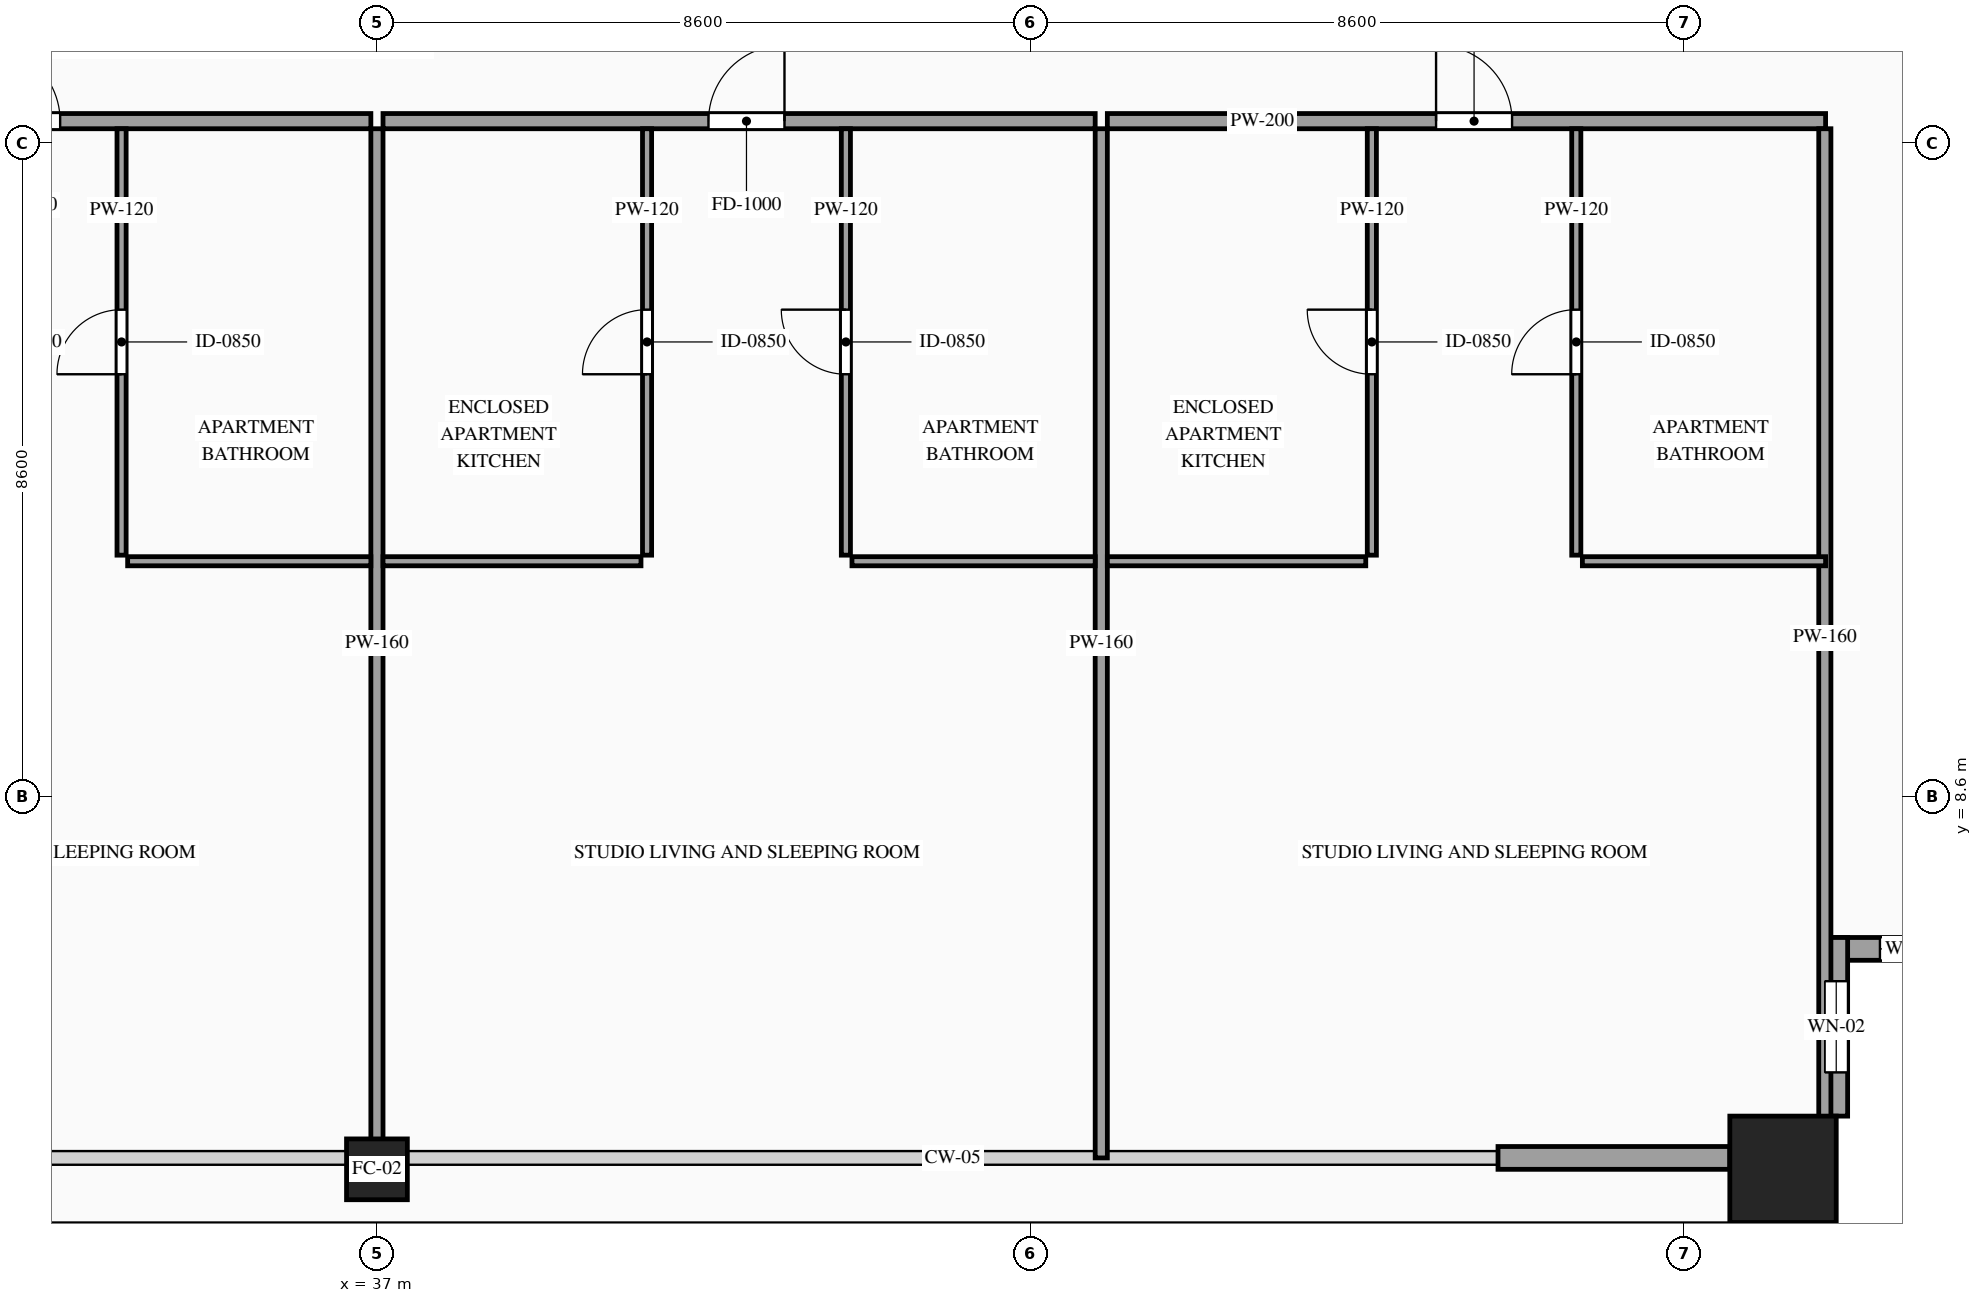
"""IFC4 building model, lengths in metres.
Left out: names, types, materials, properties, quantities, classifications, styles, units other than length and angle.
Written with IfcOpenShell. Run it as: python <this file> out.ifc"""

import sys

from ifc_helpers import new_model, si_unit, direction, frame, frame_2d, origin, origin_2d, place, context, subcontext, project, spatial, rectangle, hollow_rectangle, extrude, source, transform, mapped, element, fill, save


model = new_model("IFC4")
c1 = context("Model", 3, precision=1e-05, world=origin(), true_north=direction((0.0, 1.0)))
c2 = subcontext(c1, "Body", "Model", "MODEL_VIEW")
j1 = project(units=[si_unit("LENGTHUNIT", "METRE"), si_unit("PLANEANGLEUNIT", "RADIAN")], contexts=[c1])
p1 = place(None, origin())
s1 = spatial("IfcSite", under=j1, at=p1, CompositionType="ELEMENT")
p2 = place(p1, origin())
s2 = spatial("IfcBuilding", under=s1, at=p2, CompositionType="ELEMENT")
p3 = place(p2, frame((0.0, 0.0, 181.0)))
s3 = spatial("IfcBuildingStorey", under=s2, at=p3, CompositionType="ELEMENT", Elevation=181.0)
m1 = source(origin(), c2, "Body", "SweptSolid", [
    extrude(hollow_rectangle(XDim=0.8, YDim=0.8, WallThickness=0.036, at=origin_2d()), origin(), (0.0, 0.0, 1.0), 3.5),
])
p4 = place(p3, frame((37.0, 3.7, 0.0), z_axis=(0.0, 0.0, 1.0), x_axis=(1.0, 0.0, 0.0)))
e1 = element("IfcColumn", 1, at=p4, inside=s3, PredefinedType="COLUMN", context=c2, shape_type="MappedRepresentation", body=[
    mapped(m1, transform((0.0, 0.0, 0.0), scale=1.0)),
])
m2 = source(origin(), c2, "Body", "SweptSolid", [
    extrude(hollow_rectangle(XDim=1.4, YDim=1.4, WallThickness=0.06, at=origin_2d()), origin(), (0.0, 0.0, 1.0), 3.5),
])
p5 = place(p3, frame((55.5, 3.7, 0.0), z_axis=(0.0, 0.0, 1.0), x_axis=(1.0, 0.0, 0.0)))
e2 = element("IfcColumn", 2, at=p5, inside=s3, PredefinedType="COLUMN", context=c2, shape_type="MappedRepresentation", body=[
    mapped(m2, transform((0.0, 0.0, 0.0), scale=1.0)),
])
p6 = place(p3, frame((56.05, 6.6, 0.0), z_axis=(0.0, 0.0, 1.0), x_axis=(1.0, 0.0, 0.0)))
e3 = element("IfcWall", 3, at=p6, inside=s3, PredefinedType="SOLIDWALL", context=c2, shape_type="SweptSolid", body=[
    extrude(rectangle(XDim=2.35, YDim=0.3, at=frame_2d((1.175, 0.0))), origin(), (0.0, 0.0, 1.0), 3.28),
])
p7 = place(p6, frame((0.725, 0.0, 0.85)))
e4 = element("IfcOpeningElement", 4, at=p7, cuts=e3, PredefinedType="OPENING", context=c2, shape_type="SweptSolid", body=[
    extrude(rectangle(XDim=0.9, YDim=1.5, at=frame_2d((0.45, 0.75))), frame((0.0, 0.165, 0.0), z_axis=(0.0, -1.0, 0.0), x_axis=(1.0, 0.0, 0.0)), (0.0, 0.0, 1.0), 0.33),
])
p8 = place(p3, frame((56.2, 4.4, 0.0), z_axis=(0.0, 0.0, 1.0), x_axis=(0.0, 1.0, 0.0)))
e5 = element("IfcWall", 5, at=p8, inside=s3, PredefinedType="SOLIDWALL", context=c2, shape_type="SweptSolid", body=[
    extrude(rectangle(XDim=2.35, YDim=0.3, at=frame_2d((1.175, 0.0))), origin(), (0.0, 0.0, 1.0), 3.28),
])
p9 = place(p8, frame((0.575, 0.0, 0.85)))
e6 = element("IfcOpeningElement", 6, at=p9, cuts=e5, PredefinedType="OPENING", context=c2, shape_type="SweptSolid", body=[
    extrude(rectangle(XDim=1.2, YDim=2.1, at=frame_2d((0.6, 1.05))), frame((0.0, 0.165, 0.0), z_axis=(0.0, -1.0, 0.0), x_axis=(1.0, 0.0, 0.0)), (0.0, 0.0, 1.0), 0.33),
])
m3 = source(origin(), c2, "Body", "SweptSolid", [
    extrude(rectangle(XDim=3.05, YDim=0.3, at=frame_2d((1.525, 0.0))), origin(), (0.0, 0.0, 1.0), 2.835),
])
p10 = place(p3, frame((51.75, 3.85, 0.0), z_axis=(0.0, 0.0, 1.0), x_axis=(1.0, 0.0, 0.0)))
e7 = element("IfcWall", 7, at=p10, inside=s3, PredefinedType="SOLIDWALL", context=c2, shape_type="MappedRepresentation", body=[
    mapped(m3, transform((0.0, 0.0, 0.0), scale=1.0)),
])
p11 = place(p3, frame((27.55, 17.49, 0.0), z_axis=(0.0, 0.0, 1.0), x_axis=(1.0, 0.0, 0.0)))
e8 = element("IfcWall", 8, at=p11, inside=s3, PredefinedType="PARTITIONING", context=c2, shape_type="SweptSolid", body=[
    extrude(rectangle(XDim=9.37, YDim=0.2, at=frame_2d((4.685, 0.0))), origin(), (0.0, 0.0, 1.0), 3.28),
])
p12 = place(p11, frame((4.282, 0.0, 0.0)))
e9 = element("IfcOpeningElement", 9, at=p12, cuts=e8, PredefinedType="OPENING", context=c2, shape_type="SweptSolid", body=[
    extrude(rectangle(XDim=1.0, YDim=2.2, at=frame_2d((0.5, 1.1))), frame((0.0, 0.115, 0.0), z_axis=(0.0, -1.0, 0.0), x_axis=(1.0, 0.0, 0.0)), (0.0, 0.0, 1.0), 0.23),
])
m4 = source(origin(), c2, "Body", "SweptSolid", [
    extrude(rectangle(XDim=13.54, YDim=0.16, at=frame_2d((6.77, 0.0))), origin(), (0.0, 0.0, 1.0), 2.687),
])
p13 = place(p3, frame((37.0, 3.85, 0.0), z_axis=(0.0, 0.0, 1.0), x_axis=(0.0, 1.0, 0.0)))
e10 = element("IfcWall", 10, at=p13, inside=s3, PredefinedType="PARTITIONING", context=c2, shape_type="MappedRepresentation", body=[
    mapped(m4, transform((0.0, 0.0, 0.0), scale=1.0)),
])
m5 = source(origin(), c2, "Body", "SweptSolid", [
    extrude(rectangle(XDim=3.2, YDim=0.12, at=frame_2d((1.6, 0.0))), origin(), (0.0, 0.0, 1.0), 2.875),
])
p14 = place(p3, frame((33.72, 11.7, 0.0), z_axis=(0.0, 0.0, 1.0), x_axis=(1.0, 0.0, 0.0)))
e11 = element("IfcWall", 11, at=p14, inside=s3, PredefinedType="PARTITIONING", context=c2, shape_type="MappedRepresentation", body=[
    mapped(m5, transform((0.0, 0.0, 0.0), scale=1.0)),
])
p15 = place(p3, frame((33.64, 11.78, 0.0), z_axis=(0.0, 0.0, 1.0), x_axis=(0.0, 1.0, 0.0)))
e12 = element("IfcWall", 12, at=p15, inside=s3, PredefinedType="PARTITIONING", context=c2, shape_type="SweptSolid", body=[
    extrude(rectangle(XDim=5.61, YDim=0.12, at=frame_2d((2.805, 0.0))), origin(), (0.0, 0.0, 1.0), 3.28),
])
p16 = place(p15, frame((2.38, 0.0, 0.0)))
e13 = element("IfcOpeningElement", 13, at=p16, cuts=e12, PredefinedType="OPENING", context=c2, shape_type="SweptSolid", body=[
    extrude(rectangle(XDim=0.85, YDim=2.1, at=frame_2d((0.425, 1.05))), frame((0.0, 0.075, 0.0), z_axis=(0.0, -1.0, 0.0), x_axis=(1.0, 0.0, 0.0)), (0.0, 0.0, 1.0), 0.15),
])
p17 = place(p3, frame((37.08, 17.49, 0.0), z_axis=(0.0, 0.0, 1.0), x_axis=(1.0, 0.0, 0.0)))
e14 = element("IfcWall", 14, at=p17, inside=s3, PredefinedType="PARTITIONING", context=c2, shape_type="SweptSolid", body=[
    extrude(rectangle(XDim=9.37, YDim=0.2, at=frame_2d((4.685, 0.0))), origin(), (0.0, 0.0, 1.0), 3.28),
])
p18 = place(p17, frame((4.282, 0.0, 0.0)))
e15 = element("IfcOpeningElement", 15, at=p18, cuts=e14, PredefinedType="OPENING", context=c2, shape_type="SweptSolid", body=[
    extrude(rectangle(XDim=1.0, YDim=2.2, at=frame_2d((0.5, 1.1))), frame((0.0, 0.115, 0.0), z_axis=(0.0, -1.0, 0.0), x_axis=(1.0, 0.0, 0.0)), (0.0, 0.0, 1.0), 0.23),
])
m6 = source(origin(), c2, "Body", "SweptSolid", [
    extrude(rectangle(XDim=13.54, YDim=0.16, at=frame_2d((6.77, 0.0))), origin(), (0.0, 0.0, 1.0), 3.28),
])
p19 = place(p3, frame((46.53, 3.85, 0.0), z_axis=(0.0, 0.0, 1.0), x_axis=(0.0, 1.0, 0.0)))
e16 = element("IfcWall", 16, at=p19, inside=s3, PredefinedType="PARTITIONING", context=c2, shape_type="MappedRepresentation", body=[
    mapped(m6, transform((0.0, 0.0, 0.0), scale=1.0)),
])
m7 = source(origin(), c2, "Body", "SweptSolid", [
    extrude(rectangle(XDim=3.394, YDim=0.12, at=frame_2d((1.697, 0.0))), origin(), (0.0, 0.0, 1.0), 2.875),
])
p20 = place(p3, frame((37.08, 11.7, 0.0), z_axis=(0.0, 0.0, 1.0), x_axis=(1.0, 0.0, 0.0)))
e17 = element("IfcWall", 17, at=p20, inside=s3, PredefinedType="PARTITIONING", context=c2, shape_type="MappedRepresentation", body=[
    mapped(m7, transform((0.0, 0.0, 0.0), scale=1.0)),
])
p21 = place(p3, frame((40.554, 11.78, 0.0), z_axis=(0.0, 0.0, 1.0), x_axis=(0.0, 1.0, 0.0)))
e18 = element("IfcWall", 18, at=p21, inside=s3, PredefinedType="PARTITIONING", context=c2, shape_type="SweptSolid", body=[
    extrude(rectangle(XDim=5.61, YDim=0.12, at=frame_2d((2.805, 0.0))), origin(), (0.0, 0.0, 1.0), 3.28),
])
p22 = place(p21, frame((2.38, 0.0, 0.0)))
e19 = element("IfcOpeningElement", 19, at=p22, cuts=e18, PredefinedType="OPENING", context=c2, shape_type="SweptSolid", body=[
    extrude(rectangle(XDim=0.85, YDim=2.1, at=frame_2d((0.425, 1.05))), frame((0.0, 0.075, 0.0), z_axis=(0.0, -1.0, 0.0), x_axis=(1.0, 0.0, 0.0)), (0.0, 0.0, 1.0), 0.15),
])
p23 = place(p3, frame((43.25, 11.7, 0.0), z_axis=(0.0, 0.0, 1.0), x_axis=(1.0, 0.0, 0.0)))
e20 = element("IfcWall", 20, at=p23, inside=s3, PredefinedType="PARTITIONING", context=c2, shape_type="MappedRepresentation", body=[
    mapped(m5, transform((0.0, 0.0, 0.0), scale=1.0)),
])
p24 = place(p3, frame((43.17, 11.78, 0.0), z_axis=(0.0, 0.0, 1.0), x_axis=(0.0, 1.0, 0.0)))
e21 = element("IfcWall", 21, at=p24, inside=s3, PredefinedType="PARTITIONING", context=c2, shape_type="SweptSolid", body=[
    extrude(rectangle(XDim=5.61, YDim=0.12, at=frame_2d((2.805, 0.0))), origin(), (0.0, 0.0, 1.0), 3.28),
])
p25 = place(p24, frame((2.38, 0.0, 0.0)))
e22 = element("IfcOpeningElement", 22, at=p25, cuts=e21, PredefinedType="OPENING", context=c2, shape_type="SweptSolid", body=[
    extrude(rectangle(XDim=0.85, YDim=2.1, at=frame_2d((0.425, 1.05))), frame((0.0, 0.075, 0.0), z_axis=(0.0, -1.0, 0.0), x_axis=(1.0, 0.0, 0.0)), (0.0, 0.0, 1.0), 0.15),
])
p26 = place(p3, frame((46.61, 17.49, 0.0), z_axis=(0.0, 0.0, 1.0), x_axis=(1.0, 0.0, 0.0)))
e23 = element("IfcWall", 23, at=p26, inside=s3, PredefinedType="PARTITIONING", context=c2, shape_type="SweptSolid", body=[
    extrude(rectangle(XDim=9.45, YDim=0.2, at=frame_2d((4.725, 0.0))), origin(), (0.0, 0.0, 1.0), 3.28),
])
p27 = place(p26, frame((4.325, 0.0, 0.0)))
e24 = element("IfcOpeningElement", 24, at=p27, cuts=e23, PredefinedType="OPENING", context=c2, shape_type="SweptSolid", body=[
    extrude(rectangle(XDim=1.0, YDim=2.2, at=frame_2d((0.5, 1.1))), frame((0.0, 0.115, 0.0), z_axis=(0.0, -1.0, 0.0), x_axis=(1.0, 0.0, 0.0)), (0.0, 0.0, 1.0), 0.23),
])
m8 = source(origin(), c2, "Body", "SweptSolid", [
    extrude(rectangle(XDim=13.39, YDim=0.16, at=frame_2d((6.695, 0.0))), origin(), (0.0, 0.0, 1.0), 3.28),
])
p28 = place(p3, frame((56.05, 4.0, 0.0), z_axis=(0.0, 0.0, 1.0), x_axis=(0.0, 1.0, 0.0)))
e25 = element("IfcWall", 25, at=p28, inside=s3, PredefinedType="PARTITIONING", context=c2, shape_type="MappedRepresentation", body=[
    mapped(m8, transform((0.0, 0.0, 0.0), scale=1.0)),
])
m9 = source(origin(), c2, "Body", "SweptSolid", [
    extrude(rectangle(XDim=3.4, YDim=0.12, at=frame_2d((1.7, 0.0))), origin(), (0.0, 0.0, 1.0), 2.875),
])
p29 = place(p3, frame((46.61, 11.7, 0.0), z_axis=(0.0, 0.0, 1.0), x_axis=(1.0, 0.0, 0.0)))
e26 = element("IfcWall", 26, at=p29, inside=s3, PredefinedType="PARTITIONING", context=c2, shape_type="MappedRepresentation", body=[
    mapped(m9, transform((0.0, 0.0, 0.0), scale=1.0)),
])
p30 = place(p3, frame((50.09, 11.78, 0.0), z_axis=(0.0, 0.0, 1.0), x_axis=(0.0, 1.0, 0.0)))
e27 = element("IfcWall", 27, at=p30, inside=s3, PredefinedType="PARTITIONING", context=c2, shape_type="SweptSolid", body=[
    extrude(rectangle(XDim=5.61, YDim=0.12, at=frame_2d((2.805, 0.0))), origin(), (0.0, 0.0, 1.0), 2.775),
])
p31 = place(p30, frame((2.38, 0.0, 0.0)))
e28 = element("IfcOpeningElement", 28, at=p31, cuts=e27, PredefinedType="OPENING", context=c2, shape_type="SweptSolid", body=[
    extrude(rectangle(XDim=0.85, YDim=2.1, at=frame_2d((0.425, 1.05))), frame((0.0, 0.075, 0.0), z_axis=(0.0, -1.0, 0.0), x_axis=(1.0, 0.0, 0.0)), (0.0, 0.0, 1.0), 0.15),
])
m10 = source(origin(), c2, "Body", "SweptSolid", [
    extrude(rectangle(XDim=3.2, YDim=0.12, at=frame_2d((1.6, 0.0))), origin(), (0.0, 0.0, 1.0), 3.28),
])
p32 = place(p3, frame((52.86, 11.7, 0.0), z_axis=(0.0, 0.0, 1.0), x_axis=(1.0, 0.0, 0.0)))
e29 = element("IfcWall", 29, at=p32, inside=s3, PredefinedType="PARTITIONING", context=c2, shape_type="MappedRepresentation", body=[
    mapped(m10, transform((0.0, 0.0, 0.0), scale=1.0)),
])
p33 = place(p3, frame((52.78, 11.78, 0.0), z_axis=(0.0, 0.0, 1.0), x_axis=(0.0, 1.0, 0.0)))
e30 = element("IfcWall", 30, at=p33, inside=s3, PredefinedType="PARTITIONING", context=c2, shape_type="SweptSolid", body=[
    extrude(rectangle(XDim=5.61, YDim=0.12, at=frame_2d((2.805, 0.0))), origin(), (0.0, 0.0, 1.0), 3.28),
])
p34 = place(p33, frame((2.38, 0.0, 0.0)))
e31 = element("IfcOpeningElement", 31, at=p34, cuts=e30, PredefinedType="OPENING", context=c2, shape_type="SweptSolid", body=[
    extrude(rectangle(XDim=0.85, YDim=2.1, at=frame_2d((0.425, 1.05))), frame((0.0, 0.075, 0.0), z_axis=(0.0, -1.0, 0.0), x_axis=(1.0, 0.0, 0.0)), (0.0, 0.0, 1.0), 0.15),
])
m11 = source(origin(), c2, "Body", "SweptSolid", [
    extrude(rectangle(XDim=0.9, YDim=1.5, at=frame_2d((0.45, 0.75))), frame((0.0, 0.03, 0.0), z_axis=(0.0, -1.0, 0.0), x_axis=(1.0, 0.0, 0.0)), (0.0, 0.0, 1.0), 0.06),
])
p35 = place(p7, origin())
e32 = element("IfcWindow", 32, at=p35, inside=s3, PartitioningType="SINGLE_PANEL", PredefinedType="WINDOW", context=c2, shape_type="MappedRepresentation", body=[
    mapped(m11, transform((0.0, 0.0, 0.0), scale=1.0)),
])
fill(e4, e32)
m12 = source(origin(), c2, "Body", "SweptSolid", [
    extrude(rectangle(XDim=1.2, YDim=2.1, at=frame_2d((0.6, 1.05))), frame((0.0, 0.03, 0.0), z_axis=(0.0, -1.0, 0.0), x_axis=(1.0, 0.0, 0.0)), (0.0, 0.0, 1.0), 0.06),
])
p36 = place(p9, origin())
e33 = element("IfcWindow", 33, at=p36, inside=s3, PartitioningType="SINGLE_PANEL", PredefinedType="WINDOW", context=c2, shape_type="MappedRepresentation", body=[
    mapped(m12, transform((0.0, 0.0, 0.0), scale=1.0)),
])
fill(e6, e33)
m13 = source(origin(), c2, "Body", "SweptSolid", [
    extrude(rectangle(XDim=1.0, YDim=2.2, at=frame_2d((0.5, 1.1))), frame((0.0, 0.025, 0.0), z_axis=(0.0, -1.0, 0.0), x_axis=(1.0, 0.0, 0.0)), (0.0, 0.0, 1.0), 0.05),
])
p37 = place(p12, origin())
e34 = element("IfcDoor", 34, at=p37, inside=s3, OperationType="SINGLE_SWING_LEFT", PredefinedType="DOOR", context=c2, shape_type="MappedRepresentation", body=[
    mapped(m13, transform((0.0, 0.0, 0.0), scale=1.0)),
])
fill(e9, e34)
m14 = source(origin(), c2, "Body", "SweptSolid", [
    extrude(rectangle(XDim=0.85, YDim=2.1, at=frame_2d((0.425, 1.05))), frame((0.0, 0.025, 0.0), z_axis=(0.0, -1.0, 0.0), x_axis=(1.0, 0.0, 0.0)), (0.0, 0.0, 1.0), 0.05),
])
p38 = place(p16, origin())
e35 = element("IfcDoor", 35, at=p38, inside=s3, OperationType="SINGLE_SWING_LEFT", PredefinedType="DOOR", context=c2, shape_type="MappedRepresentation", body=[
    mapped(m14, transform((0.0, 0.0, 0.0), scale=1.0)),
])
fill(e13, e35)
p39 = place(p18, origin())
e36 = element("IfcDoor", 36, at=p39, inside=s3, OperationType="SINGLE_SWING_RIGHT", PredefinedType="DOOR", context=c2, shape_type="MappedRepresentation", body=[
    mapped(m13, transform((0.0, 0.0, 0.0), scale=1.0)),
])
fill(e15, e36)
p40 = place(p22, origin())
e37 = element("IfcDoor", 37, at=p40, inside=s3, OperationType="SINGLE_SWING_LEFT", PredefinedType="DOOR", context=c2, shape_type="MappedRepresentation", body=[
    mapped(m14, transform((0.0, 0.0, 0.0), scale=1.0)),
])
fill(e19, e37)
p41 = place(p25, origin())
e38 = element("IfcDoor", 38, at=p41, inside=s3, OperationType="SINGLE_SWING_RIGHT", PredefinedType="DOOR", context=c2, shape_type="MappedRepresentation", body=[
    mapped(m14, transform((0.0, 0.0, 0.0), scale=1.0)),
])
fill(e22, e38)
p42 = place(p27, origin())
e39 = element("IfcDoor", 39, at=p42, inside=s3, OperationType="SINGLE_SWING_LEFT", PredefinedType="DOOR", context=c2, shape_type="MappedRepresentation", body=[
    mapped(m13, transform((0.0, 0.0, 0.0), scale=1.0)),
])
fill(e24, e39)
p43 = place(p31, origin())
e40 = element("IfcDoor", 40, at=p43, inside=s3, OperationType="SINGLE_SWING_RIGHT", PredefinedType="DOOR", context=c2, shape_type="MappedRepresentation", body=[
    mapped(m14, transform((0.0, 0.0, 0.0), scale=1.0)),
])
fill(e28, e40)
p44 = place(p34, origin())
e41 = element("IfcDoor", 41, at=p44, inside=s3, OperationType="SINGLE_SWING_LEFT", PredefinedType="DOOR", context=c2, shape_type="MappedRepresentation", body=[
    mapped(m14, transform((0.0, 0.0, 0.0), scale=1.0)),
])
fill(e31, e41)
save(model, sys.argv[1])
